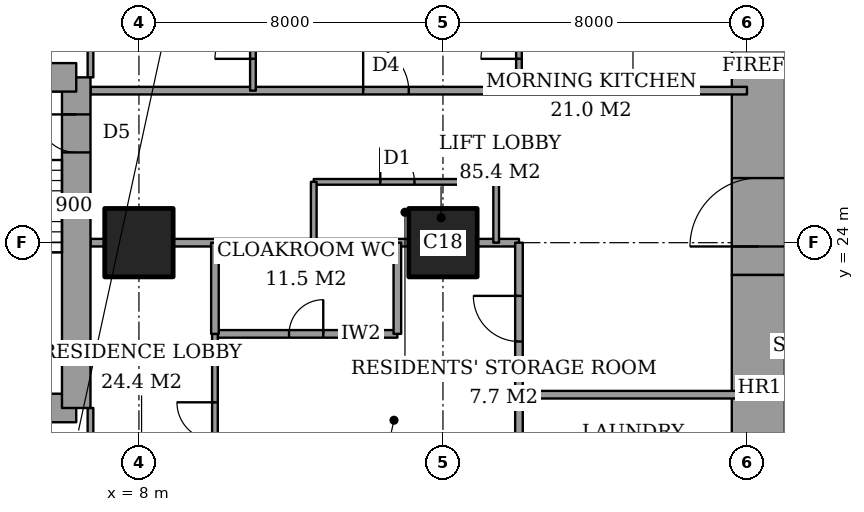
"""IFC4 building model, lengths in metres.
Left out: names, types, materials, properties, quantities, classifications, styles, units other than length and angle.
Written with IfcOpenShell. Run it as: python <this file> out.ifc"""

import sys

from ifc_helpers import new_model, si_unit, direction, frame, frame_2d, origin, origin_2d, place, context, subcontext, project, spatial, rectangle, extrude, element, fill, save


model = new_model("IFC4")
c1 = context("Model", 3, precision=1e-05, world=origin(), true_north=direction((0.0, 1.0)))
c2 = subcontext(c1, "Body", "Model", "MODEL_VIEW")
j1 = project(units=[si_unit("LENGTHUNIT", "METRE"), si_unit("PLANEANGLEUNIT", "RADIAN")], contexts=[c1])
p1 = place(None, origin())
s1 = spatial("IfcSite", under=j1, at=p1, CompositionType="ELEMENT")
p2 = place(p1, origin())
s2 = spatial("IfcBuilding", under=s1, at=p2, CompositionType="ELEMENT")
p3 = place(p2, frame((0.0, 0.0, 207.4)))
s3 = spatial("IfcBuildingStorey", under=s2, at=p3, CompositionType="ELEMENT", Elevation=207.4)
for number, where, z_axis, x_axis in (
    (1, (8.0, 24.0, 0.0), (0.0, 0.0, 1.0), (1.0, 0.0, 0.0)),
    (2, (16.0, 24.0, 0.0), (0.0, 0.0, 1.0), (1.0, 0.0, 0.0)),
):
    element("IfcColumn", number, at=place(p3, frame(where, z_axis=z_axis, x_axis=x_axis)), inside=s3, PredefinedType="COLUMN", context=c2, shape_type="SweptSolid", body=[
        extrude(rectangle(XDim=1.8, YDim=1.8, at=origin_2d()), origin(), (0.0, 0.0, 1.0), 3.6),
    ])
p4 = place(p3, frame((24.3, 13.0, 0.0), z_axis=(0.0, 0.0, 1.0), x_axis=(0.0, 1.0, 0.0)))
e3 = element("IfcWall", 3, at=p4, inside=s3, PredefinedType="SHEAR", context=c2, shape_type="SweptSolid", body=[
    extrude(rectangle(XDim=10.15, YDim=1.4, at=frame_2d((5.075, 0.0))), origin(), (0.0, 0.0, 1.0), 3.6),
])
p5 = place(p3, frame((24.3, 23.15, 0.0), z_axis=(0.0, 0.0, 1.0), x_axis=(0.0, 1.0, 0.0)))
e4 = element("IfcWall", 4, at=p5, inside=s3, PredefinedType="SHEAR", context=c2, shape_type="SweptSolid", body=[
    extrude(rectangle(XDim=11.85, YDim=1.4, at=frame_2d((5.925, 0.0))), origin(), (0.0, 0.0, 1.0), 3.6),
])
p6 = place(p5, frame((0.75, 0.0, 0.0)))
e5 = element("IfcOpeningElement", 5, at=p6, cuts=e4, PredefinedType="OPENING", context=c2, shape_type="SweptSolid", body=[
    extrude(rectangle(XDim=1.8, YDim=2.4, at=frame_2d((0.9, 1.2))), frame((0.0, 0.71, 0.0), z_axis=(0.0, -1.0, 0.0), x_axis=(1.0, 0.0, 0.0)), (0.0, 0.0, 1.0), 1.42),
])
p7 = place(p3, frame((1.9, 19.65, 0.0), z_axis=(0.0, 0.0, 1.0), x_axis=(1.0, 0.0, 0.0)))
e6 = element("IfcWall", 6, at=p7, inside=s3, PredefinedType="SHEAR", context=c2, shape_type="SweptSolid", body=[
    extrude(rectangle(XDim=4.45, YDim=0.75, at=frame_2d((2.225, 0.0))), origin(), (0.0, 0.0, 1.0), 3.6),
])
p8 = place(p3, frame((6.35, 19.65, 0.0), z_axis=(0.0, 0.0, 1.0), x_axis=(0.0, 1.0, 0.0)))
e7 = element("IfcWall", 7, at=p8, inside=s3, PredefinedType="SHEAR", context=c2, shape_type="SweptSolid", body=[
    extrude(rectangle(XDim=8.7, YDim=0.75, at=frame_2d((4.35, 0.0))), origin(), (0.0, 0.0, 1.0), 3.6),
])
p9 = place(p8, frame((6.725, 0.0, 0.0)))
e8 = element("IfcOpeningElement", 8, at=p9, cuts=e7, PredefinedType="OPENING", context=c2, shape_type="SweptSolid", body=[
    extrude(rectangle(XDim=1.0, YDim=2.1, at=frame_2d((0.5, 1.05))), frame((0.0, 0.385, 0.0), z_axis=(0.0, -1.0, 0.0), x_axis=(1.0, 0.0, 0.0)), (0.0, 0.0, 1.0), 0.77),
])
p10 = place(p3, frame((6.35, 28.35, 0.0), z_axis=(0.0, 0.0, 1.0), x_axis=(-1.0, 0.0, 0.0)))
e9 = element("IfcWall", 9, at=p10, inside=s3, PredefinedType="SHEAR", context=c2, shape_type="SweptSolid", body=[
    extrude(rectangle(XDim=4.45, YDim=0.75, at=frame_2d((2.225, 0.0))), origin(), (0.0, 0.0, 1.0), 3.6),
])
p11 = place(p3, frame((18.0, 20.0, 0.0), z_axis=(0.0, 0.0, 1.0), x_axis=(1.0, 0.0, 0.0)))
e10 = element("IfcWall", 10, at=p11, inside=s3, PredefinedType="PARTITIONING", context=c2, shape_type="SweptSolid", body=[
    extrude(rectangle(XDim=6.0, YDim=0.2, at=frame_2d((3.0, 0.0))), origin(), (0.0, 0.0, 1.0), 3.35),
])
p12 = place(p3, frame((10.0, 21.6, 0.0), z_axis=(0.0, 0.0, 1.0), x_axis=(1.0, 0.0, 0.0)))
e11 = element("IfcWall", 11, at=p12, inside=s3, PredefinedType="PARTITIONING", context=c2, shape_type="SweptSolid", body=[
    extrude(rectangle(XDim=4.8, YDim=0.2, at=frame_2d((2.4, 0.0))), origin(), (0.0, 0.0, 1.0), 3.35),
])
p13 = place(p12, frame((1.95, 0.0, 0.0)))
e12 = element("IfcOpeningElement", 12, at=p13, cuts=e11, PredefinedType="OPENING", context=c2, shape_type="SweptSolid", body=[
    extrude(rectangle(XDim=0.9, YDim=2.1, at=frame_2d((0.45, 1.05))), frame((0.0, 0.11, 0.0), z_axis=(0.0, -1.0, 0.0), x_axis=(1.0, 0.0, 0.0)), (0.0, 0.0, 1.0), 0.22),
])
p14 = place(p3, frame((6.725, 24.0, 0.0), z_axis=(0.0, 0.0, 1.0), x_axis=(1.0, 0.0, 0.0)))
e13 = element("IfcWall", 13, at=p14, inside=s3, PredefinedType="PARTITIONING", context=c2, shape_type="SweptSolid", body=[
    extrude(rectangle(XDim=0.375, YDim=0.2, at=frame_2d((0.188, 0.0))), origin(), (0.0, 0.0, 1.0), 3.35),
])
p15 = place(p3, frame((8.9, 24.0, 0.0), z_axis=(0.0, 0.0, 1.0), x_axis=(1.0, 0.0, 0.0)))
e14 = element("IfcWall", 14, at=p15, inside=s3, PredefinedType="PARTITIONING", context=c2, shape_type="SweptSolid", body=[
    extrude(rectangle(XDim=6.2, YDim=0.2, at=frame_2d((3.1, 0.0))), origin(), (0.0, 0.0, 1.0), 3.35),
])
p16 = place(p3, frame((16.9, 24.0, 0.0), z_axis=(0.0, 0.0, 1.0), x_axis=(1.0, 0.0, 0.0)))
e15 = element("IfcWall", 15, at=p16, inside=s3, PredefinedType="PARTITIONING", context=c2, shape_type="SweptSolid", body=[
    extrude(rectangle(XDim=1.1, YDim=0.2, at=frame_2d((0.55, 0.0))), origin(), (0.0, 0.0, 1.0), 3.35),
])
p17 = place(p3, frame((12.6, 25.6, 0.0), z_axis=(0.0, 0.0, 1.0), x_axis=(1.0, 0.0, 0.0)))
e16 = element("IfcWall", 16, at=p17, inside=s3, PredefinedType="PARTITIONING", context=c2, shape_type="SweptSolid", body=[
    extrude(rectangle(XDim=4.8, YDim=0.15, at=frame_2d((2.4, 0.0))), origin(), (0.0, 0.0, 1.0), 3.35),
])
p18 = place(p17, frame((1.75, 0.0, 0.0)))
e17 = element("IfcOpeningElement", 17, at=p18, cuts=e16, PredefinedType="OPENING", context=c2, shape_type="SweptSolid", body=[
    extrude(rectangle(XDim=0.9, YDim=2.1, at=frame_2d((0.45, 1.05))), frame((0.0, 0.085, 0.0), z_axis=(0.0, -1.0, 0.0), x_axis=(1.0, 0.0, 0.0)), (0.0, 0.0, 1.0), 0.17),
])
p19 = place(p3, frame((6.725, 28.0, 0.0), z_axis=(0.0, 0.0, 1.0), x_axis=(1.0, 0.0, 0.0)))
e18 = element("IfcWall", 18, at=p19, inside=s3, PredefinedType="PARTITIONING", context=c2, shape_type="SweptSolid", body=[
    extrude(rectangle(XDim=17.275, YDim=0.2, at=frame_2d((8.637, 0.0))), origin(), (0.0, 0.0, 1.0), 3.35),
])
p20 = place(p19, frame((7.175, 0.0, 0.0)))
e19 = element("IfcOpeningElement", 19, at=p20, cuts=e18, PredefinedType="OPENING", context=c2, shape_type="SweptSolid", body=[
    extrude(rectangle(XDim=1.2, YDim=2.4, at=frame_2d((0.6, 1.2))), frame((0.0, 0.11, 0.0), z_axis=(0.0, -1.0, 0.0), x_axis=(1.0, 0.0, 0.0)), (0.0, 0.0, 1.0), 0.22),
])
p21 = place(p3, frame((6.725, 17.2, 0.0), z_axis=(0.0, 0.0, 1.0), x_axis=(0.0, 1.0, 0.0)))
e20 = element("IfcWall", 20, at=p21, inside=s3, PredefinedType="PARTITIONING", context=c2, shape_type="SweptSolid", body=[
    extrude(rectangle(XDim=2.45, YDim=0.15, at=frame_2d((1.225, 0.0))), origin(), (0.0, 0.0, 1.0), 3.35),
])
p22 = place(p21, frame((0.538, 0.0, 0.0)))
e21 = element("IfcOpeningElement", 21, at=p22, cuts=e20, PredefinedType="OPENING", context=c2, shape_type="SweptSolid", body=[
    extrude(rectangle(XDim=1.0, YDim=2.1, at=frame_2d((0.5, 1.05))), frame((0.0, 0.085, 0.0), z_axis=(0.0, -1.0, 0.0), x_axis=(1.0, 0.0, 0.0)), (0.0, 0.0, 1.0), 0.17),
])
p23 = place(p3, frame((6.725, 28.35, 0.0), z_axis=(0.0, 0.0, 1.0), x_axis=(0.0, 1.0, 0.0)))
e22 = element("IfcWall", 22, at=p23, inside=s3, PredefinedType="PARTITIONING", context=c2, shape_type="SweptSolid", body=[
    extrude(rectangle(XDim=2.45, YDim=0.15, at=frame_2d((1.225, 0.0))), origin(), (0.0, 0.0, 1.0), 3.35),
])
p24 = place(p23, frame((0.913, 0.0, 0.0)))
e23 = element("IfcOpeningElement", 23, at=p24, cuts=e22, PredefinedType="OPENING", context=c2, shape_type="SweptSolid", body=[
    extrude(rectangle(XDim=1.0, YDim=2.1, at=frame_2d((0.5, 1.05))), frame((0.0, 0.085, 0.0), z_axis=(0.0, -1.0, 0.0), x_axis=(1.0, 0.0, 0.0)), (0.0, 0.0, 1.0), 0.17),
])
p25 = place(p3, frame((10.0, 21.6, 0.0), z_axis=(0.0, 0.0, 1.0), x_axis=(0.0, 1.0, 0.0)))
e24 = element("IfcWall", 24, at=p25, inside=s3, PredefinedType="PARTITIONING", context=c2, shape_type="SweptSolid", body=[
    extrude(rectangle(XDim=2.4, YDim=0.2, at=frame_2d((1.2, 0.0))), origin(), (0.0, 0.0, 1.0), 3.35),
])
p26 = place(p3, frame((10.0, 10.6, 0.0), z_axis=(0.0, 0.0, 1.0), x_axis=(0.0, 1.0, 0.0)))
e25 = element("IfcWall", 25, at=p26, inside=s3, PredefinedType="PARTITIONING", context=c2, shape_type="SweptSolid", body=[
    extrude(rectangle(XDim=11.0, YDim=0.15, at=frame_2d((5.5, 0.0))), origin(), (0.0, 0.0, 1.0), 3.35),
])
p27 = place(p26, frame((8.2, 0.0, 0.0)))
e26 = element("IfcOpeningElement", 26, at=p27, cuts=e25, PredefinedType="OPENING", context=c2, shape_type="SweptSolid", body=[
    extrude(rectangle(XDim=1.0, YDim=2.1, at=frame_2d((0.5, 1.05))), frame((0.0, 0.085, 0.0), z_axis=(0.0, -1.0, 0.0), x_axis=(1.0, 0.0, 0.0)), (0.0, 0.0, 1.0), 0.17),
])
p28 = place(p3, frame((11.0, 28.0, 0.0), z_axis=(0.0, 0.0, 1.0), x_axis=(0.0, 1.0, 0.0)))
e27 = element("IfcWall", 27, at=p28, inside=s3, PredefinedType="PARTITIONING", context=c2, shape_type="SweptSolid", body=[
    extrude(rectangle(XDim=9.2, YDim=0.15, at=frame_2d((4.6, 0.0))), origin(), (0.0, 0.0, 1.0), 3.35),
])
p29 = place(p28, frame((0.837, 0.0, 0.0)))
e28 = element("IfcOpeningElement", 28, at=p29, cuts=e27, PredefinedType="OPENING", context=c2, shape_type="SweptSolid", body=[
    extrude(rectangle(XDim=1.0, YDim=2.1, at=frame_2d((0.5, 1.05))), frame((0.0, 0.085, 0.0), z_axis=(0.0, -1.0, 0.0), x_axis=(1.0, 0.0, 0.0)), (0.0, 0.0, 1.0), 0.17),
])
p30 = place(p3, frame((12.6, 24.0, 0.0), z_axis=(0.0, 0.0, 1.0), x_axis=(0.0, 1.0, 0.0)))
e29 = element("IfcWall", 29, at=p30, inside=s3, PredefinedType="PARTITIONING", context=c2, shape_type="SweptSolid", body=[
    extrude(rectangle(XDim=1.6, YDim=0.15, at=frame_2d((0.8, 0.0))), origin(), (0.0, 0.0, 1.0), 3.35),
])
p31 = place(p3, frame((14.8, 21.6, 0.0), z_axis=(0.0, 0.0, 1.0), x_axis=(0.0, 1.0, 0.0)))
e30 = element("IfcWall", 30, at=p31, inside=s3, PredefinedType="PARTITIONING", context=c2, shape_type="SweptSolid", body=[
    extrude(rectangle(XDim=2.4, YDim=0.2, at=frame_2d((1.2, 0.0))), origin(), (0.0, 0.0, 1.0), 3.35),
])
p32 = place(p3, frame((17.4, 24.0, 0.0), z_axis=(0.0, 0.0, 1.0), x_axis=(0.0, 1.0, 0.0)))
e31 = element("IfcWall", 31, at=p32, inside=s3, PredefinedType="PARTITIONING", context=c2, shape_type="SweptSolid", body=[
    extrude(rectangle(XDim=1.6, YDim=0.15, at=frame_2d((0.8, 0.0))), origin(), (0.0, 0.0, 1.0), 3.35),
])
p33 = place(p3, frame((18.0, 17.0, 0.0), z_axis=(0.0, 0.0, 1.0), x_axis=(0.0, 1.0, 0.0)))
e32 = element("IfcWall", 32, at=p33, inside=s3, PredefinedType="PARTITIONING", context=c2, shape_type="SweptSolid", body=[
    extrude(rectangle(XDim=7.0, YDim=0.2, at=frame_2d((3.5, 0.0))), origin(), (0.0, 0.0, 1.0), 3.35),
])
p34 = place(p33, frame((4.4, 0.0, 0.0)))
e33 = element("IfcOpeningElement", 33, at=p34, cuts=e32, PredefinedType="OPENING", context=c2, shape_type="SweptSolid", body=[
    extrude(rectangle(XDim=1.2, YDim=2.4, at=frame_2d((0.6, 1.2))), frame((0.0, 0.11, 0.0), z_axis=(0.0, -1.0, 0.0), x_axis=(1.0, 0.0, 0.0)), (0.0, 0.0, 1.0), 0.22),
])
p35 = place(p33, frame((1.05, 0.0, 0.0)))
e34 = element("IfcOpeningElement", 34, at=p35, cuts=e32, PredefinedType="OPENING", context=c2, shape_type="SweptSolid", body=[
    extrude(rectangle(XDim=0.9, YDim=2.1, at=frame_2d((0.45, 1.05))), frame((0.0, 0.11, 0.0), z_axis=(0.0, -1.0, 0.0), x_axis=(1.0, 0.0, 0.0)), (0.0, 0.0, 1.0), 0.22),
])
p36 = place(p3, frame((18.0, 28.0, 0.0), z_axis=(0.0, 0.0, 1.0), x_axis=(0.0, 1.0, 0.0)))
e35 = element("IfcWall", 35, at=p36, inside=s3, PredefinedType="PARTITIONING", context=c2, shape_type="SweptSolid", body=[
    extrude(rectangle(XDim=9.2, YDim=0.15, at=frame_2d((4.6, 0.0))), origin(), (0.0, 0.0, 1.0), 3.35),
])
p37 = place(p36, frame((0.837, 0.0, 0.0)))
e36 = element("IfcOpeningElement", 36, at=p37, cuts=e35, PredefinedType="OPENING", context=c2, shape_type="SweptSolid", body=[
    extrude(rectangle(XDim=1.0, YDim=2.1, at=frame_2d((0.5, 1.05))), frame((0.0, 0.085, 0.0), z_axis=(0.0, -1.0, 0.0), x_axis=(1.0, 0.0, 0.0)), (0.0, 0.0, 1.0), 0.17),
])
p38 = place(p27, origin())
e37 = element("IfcDoor", 37, at=p38, inside=s3, OperationType="SINGLE_SWING_LEFT", PredefinedType="DOOR", context=c2, shape_type="SweptSolid", body=[
    extrude(rectangle(XDim=1.0, YDim=2.1, at=frame_2d((0.5, 1.05))), frame((0.0, 0.025, 0.0), z_axis=(0.0, -1.0, 0.0), x_axis=(1.0, 0.0, 0.0)), (0.0, 0.0, 1.0), 0.05),
])
fill(e26, e37)
p39 = place(p13, origin())
e38 = element("IfcDoor", 38, at=p39, inside=s3, OperationType="SINGLE_SWING_LEFT", PredefinedType="DOOR", context=c2, shape_type="SweptSolid", body=[
    extrude(rectangle(XDim=0.9, YDim=2.1, at=frame_2d((0.45, 1.05))), frame((0.0, 0.025, 0.0), z_axis=(0.0, -1.0, 0.0), x_axis=(1.0, 0.0, 0.0)), (0.0, 0.0, 1.0), 0.05),
])
fill(e12, e38)
p40 = place(p34, origin())
e39 = element("IfcDoor", 39, at=p40, inside=s3, OperationType="SINGLE_SWING_LEFT", PredefinedType="DOOR", context=c2, shape_type="SweptSolid", body=[
    extrude(rectangle(XDim=1.2, YDim=2.4, at=frame_2d((0.6, 1.2))), frame((0.0, 0.025, 0.0), z_axis=(0.0, -1.0, 0.0), x_axis=(1.0, 0.0, 0.0)), (0.0, 0.0, 1.0), 0.05),
])
fill(e33, e39)
p41 = place(p29, origin())
e40 = element("IfcDoor", 40, at=p41, inside=s3, OperationType="SINGLE_SWING_RIGHT", PredefinedType="DOOR", context=c2, shape_type="SweptSolid", body=[
    extrude(rectangle(XDim=1.0, YDim=2.1, at=frame_2d((0.5, 1.05))), frame((0.0, 0.025, 0.0), z_axis=(0.0, -1.0, 0.0), x_axis=(1.0, 0.0, 0.0)), (0.0, 0.0, 1.0), 0.05),
])
fill(e28, e40)
p42 = place(p20, origin())
e41 = element("IfcDoor", 41, at=p42, inside=s3, OperationType="SINGLE_SWING_RIGHT", PredefinedType="DOOR", context=c2, shape_type="SweptSolid", body=[
    extrude(rectangle(XDim=1.2, YDim=2.4, at=frame_2d((0.6, 1.2))), frame((0.0, 0.025, 0.0), z_axis=(0.0, -1.0, 0.0), x_axis=(1.0, 0.0, 0.0)), (0.0, 0.0, 1.0), 0.05),
])
fill(e19, e41)
p43 = place(p37, origin())
e42 = element("IfcDoor", 42, at=p43, inside=s3, OperationType="SINGLE_SWING_RIGHT", PredefinedType="DOOR", context=c2, shape_type="SweptSolid", body=[
    extrude(rectangle(XDim=1.0, YDim=2.1, at=frame_2d((0.5, 1.05))), frame((0.0, 0.025, 0.0), z_axis=(0.0, -1.0, 0.0), x_axis=(1.0, 0.0, 0.0)), (0.0, 0.0, 1.0), 0.05),
])
fill(e36, e42)
p44 = place(p18, origin())
e43 = element("IfcDoor", 43, at=p44, inside=s3, OperationType="SINGLE_SWING_RIGHT", PredefinedType="DOOR", context=c2, shape_type="SweptSolid", body=[
    extrude(rectangle(XDim=0.9, YDim=2.1, at=frame_2d((0.45, 1.05))), frame((0.0, 0.025, 0.0), z_axis=(0.0, -1.0, 0.0), x_axis=(1.0, 0.0, 0.0)), (0.0, 0.0, 1.0), 0.05),
])
fill(e17, e43)
p45 = place(p6, origin())
e44 = element("IfcDoor", 44, at=p45, inside=s3, OperationType="DOUBLE_DOOR_DOUBLE_SWING", PredefinedType="DOOR", context=c2, shape_type="SweptSolid", body=[
    extrude(rectangle(XDim=1.8, YDim=2.4, at=frame_2d((0.9, 1.2))), frame((0.0, 0.025, 0.0), z_axis=(0.0, -1.0, 0.0), x_axis=(1.0, 0.0, 0.0)), (0.0, 0.0, 1.0), 0.05),
])
fill(e5, e44)
p46 = place(p9, origin())
e45 = element("IfcDoor", 45, at=p46, inside=s3, OperationType="SINGLE_SWING_LEFT", PredefinedType="DOOR", context=c2, shape_type="SweptSolid", body=[
    extrude(rectangle(XDim=1.0, YDim=2.1, at=frame_2d((0.5, 1.05))), frame((0.0, 0.025, 0.0), z_axis=(0.0, -1.0, 0.0), x_axis=(1.0, 0.0, 0.0)), (0.0, 0.0, 1.0), 0.05),
])
fill(e8, e45)
save(model, sys.argv[1])
